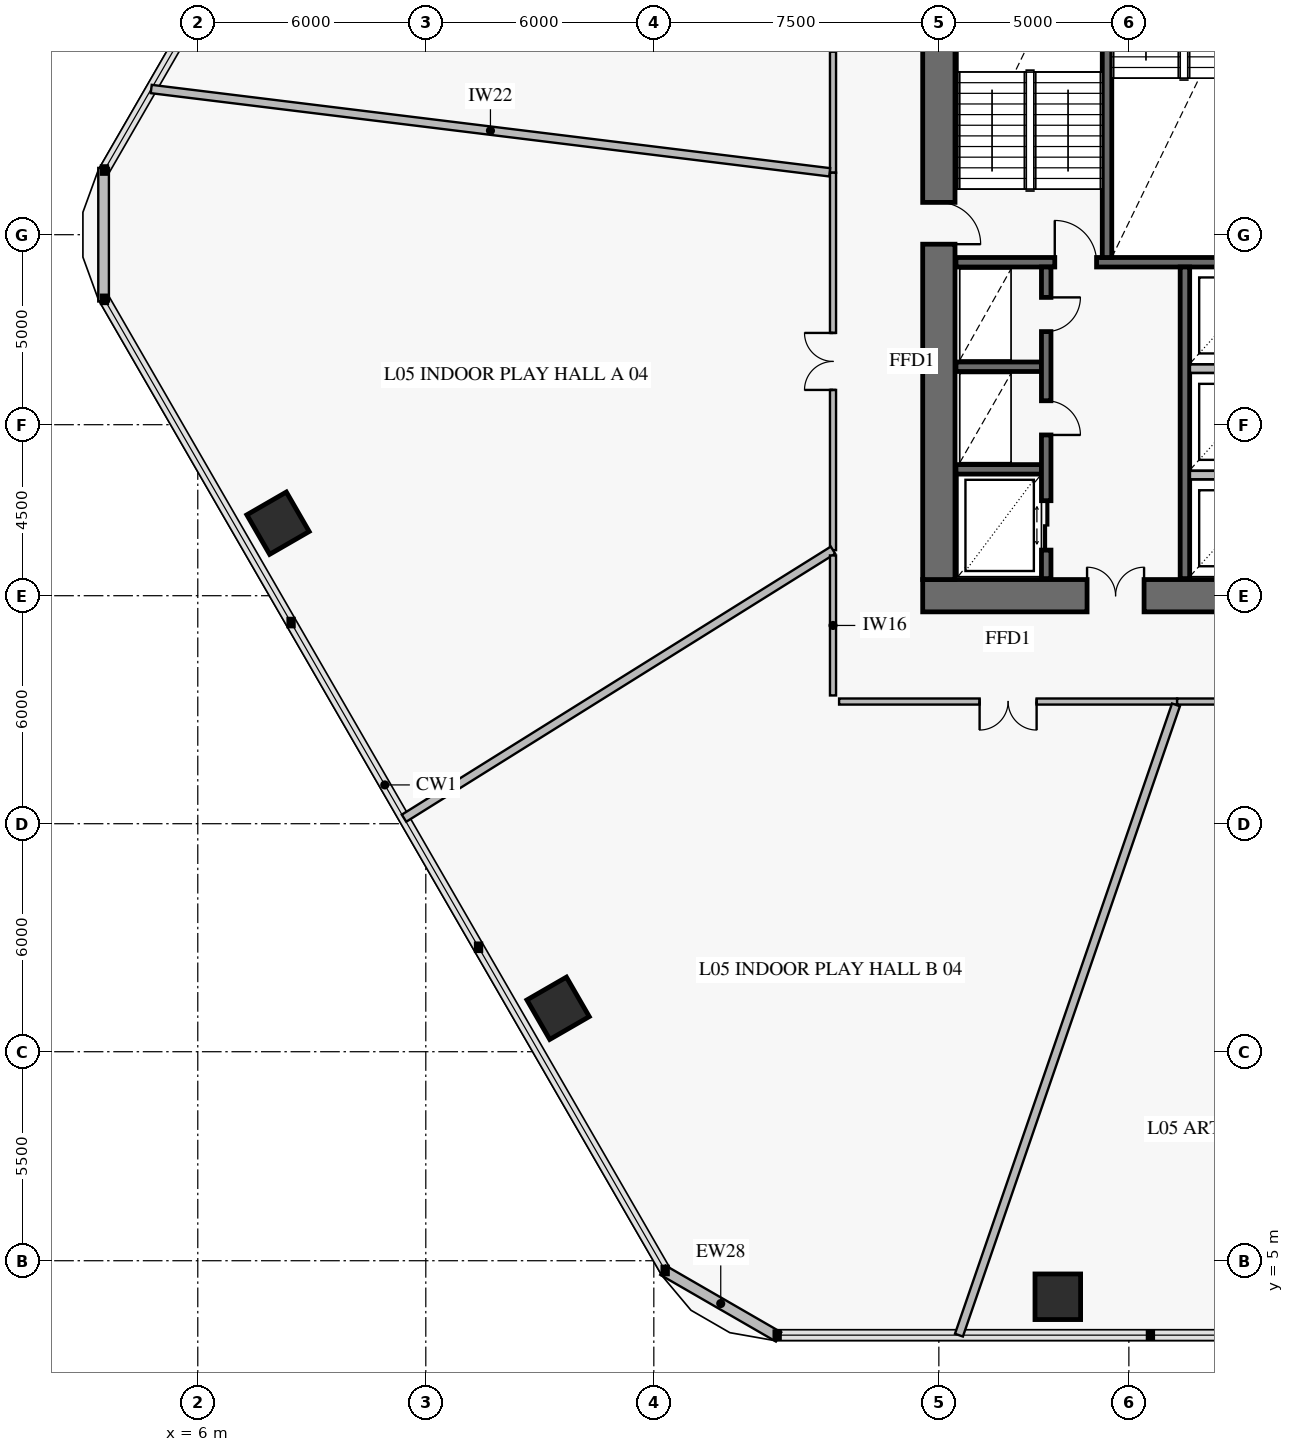
"""IFC4 building model, lengths in metres.
Left out: names, types, materials, properties, quantities, classifications, styles, units other than length and angle.
Written with IfcOpenShell. Run it as: python <this file> out.ifc"""

import sys

from ifc_helpers import new_model, si_unit, direction, frame, frame_2d, origin, origin_2d, place, context, subcontext, project, spatial, rectangle, extrude, element, fill, save


model = new_model("IFC4")
c1 = context("Model", 3, precision=1e-05, world=origin(), true_north=direction((0.0, 1.0)))
c2 = subcontext(c1, "Body", "Model", "MODEL_VIEW")
j1 = project(units=[si_unit("LENGTHUNIT", "METRE"), si_unit("PLANEANGLEUNIT", "RADIAN")], contexts=[c1])
p1 = place(None, origin())
s1 = spatial("IfcSite", under=j1, at=p1, CompositionType="ELEMENT")
p2 = place(p1, origin())
s2 = spatial("IfcBuilding", under=s1, at=p2, CompositionType="ELEMENT")
p3 = place(p2, frame((0.0, 0.0, 20.4)))
s3 = spatial("IfcBuildingStorey", under=s2, at=p3, CompositionType="ELEMENT", Elevation=20.4)
p4 = place(p3, frame((25.075, 22.5, 0.0), z_axis=(0.0, 0.0, 1.0), x_axis=(1.0, 0.0, 0.0)))
e1 = element("IfcWall", 1, at=p4, inside=s3, PredefinedType="SHEAR", context=c2, shape_type="SweptSolid", body=[
    extrude(rectangle(XDim=9.975, YDim=0.85, at=frame_2d((4.988, 0.0))), origin(), (0.0, 0.0, 1.0), 4.2),
])
p5 = place(p4, frame((4.325, 0.0, 0.0)))
e2 = element("IfcOpeningElement", 2, at=p5, cuts=e1, PredefinedType="OPENING", context=c2, shape_type="SweptSolid", body=[
    extrude(rectangle(XDim=1.5, YDim=2.15, at=frame_2d((0.75, 1.075))), frame((0.0, 0.437, 0.0), z_axis=(0.0, -1.0, 0.0), x_axis=(1.0, 0.0, 0.0)), (0.0, 0.0, 1.0), 0.874),
])
p6 = place(p3, frame((25.5, 22.925, 0.0), z_axis=(0.0, 0.0, 1.0), x_axis=(0.0, 1.0, 0.0)))
e3 = element("IfcWall", 3, at=p6, inside=s3, PredefinedType="SHEAR", context=c2, shape_type="SweptSolid", body=[
    extrude(rectangle(XDim=18.15, YDim=0.85, at=frame_2d((9.075, 0.0))), origin(), (0.0, 0.0, 1.0), 4.2),
])
p7 = place(p6, frame((8.825, 0.0, 0.0)))
e4 = element("IfcOpeningElement", 4, at=p7, cuts=e3, PredefinedType="OPENING", context=c2, shape_type="SweptSolid", body=[
    extrude(rectangle(XDim=1.1, YDim=2.15, at=frame_2d((0.55, 1.075))), frame((0.0, 0.437, 0.0), z_axis=(0.0, -1.0, 0.0), x_axis=(1.0, 0.0, 0.0)), (0.0, 0.0, 1.0), 0.874),
])
for number, where, z_axis, x_axis in (
    (5, (8.111, 24.408, 0.0), (0.0, 0.0, 1.0), (0.5, -0.866, 0.0)),
    (6, (15.481, 11.643, 0.0), (0.0, 0.0, 1.0), (0.5, -0.866, 0.0)),
    (7, (28.63, 4.052, 0.0), (0.0, 0.0, 1.0), (1.0, 0.0, 0.0)),
):
    element("IfcColumn", number, at=place(p3, frame(where, z_axis=z_axis, x_axis=x_axis)), inside=s3, PredefinedType="COLUMN", context=c2, shape_type="SweptSolid", body=[
        extrude(rectangle(XDim=1.2, YDim=1.2, at=origin_2d()), origin(), (0.0, 0.0, 1.0), 3.92),
    ])
p8 = place(p3, frame((21.283, 2.994, 0.0), z_axis=(0.0, 0.0, 1.0), x_axis=(-0.866007452331, 0.500031091541, 0.0)))
e8 = element("IfcWall", 8, at=p8, inside=s3, PredefinedType="SOLIDWALL", context=c2, shape_type="SweptSolid", body=[
    extrude(rectangle(XDim=3.515, YDim=0.28, at=frame_2d((1.757, 0.0))), origin(), (0.0, 0.0, 1.0), 3.92),
])
p9 = place(p3, frame((3.521, 30.242, 0.0), z_axis=(0.0, 0.0, 1.0), x_axis=(0.0, 1.0, 0.0)))
e9 = element("IfcWall", 9, at=p9, inside=s3, PredefinedType="SOLIDWALL", context=c2, shape_type="SweptSolid", body=[
    extrude(rectangle(XDim=3.515, YDim=0.28, at=frame_2d((1.758, 0.0))), origin(), (0.0, 0.0, 1.0), 3.92),
])
p10 = place(p3, frame((25.95, 31.275, 0.0), z_axis=(0.0, 0.0, 1.0), x_axis=(1.0, 0.0, 0.0)))
e10 = element("IfcWall", 10, at=p10, inside=s3, PredefinedType="SOLIDWALL", context=c2, shape_type="SweptSolid", body=[
    extrude(rectangle(XDim=20.1, YDim=0.25, at=frame_2d((10.05, 0.0))), origin(), (0.0, 0.0, 1.0), 4.2),
])
p11 = place(p10, frame((2.6, 0.0, 0.0)))
e11 = element("IfcOpeningElement", 11, at=p11, cuts=e10, PredefinedType="OPENING", context=c2, shape_type="SweptSolid", body=[
    extrude(rectangle(XDim=1.1, YDim=2.15, at=frame_2d((0.55, 1.075))), frame((0.0, 0.137, 0.0), z_axis=(0.0, -1.0, 0.0), x_axis=(1.0, 0.0, 0.0)), (0.0, 0.0, 1.0), 0.274),
])
p12 = place(p10, frame((10.6, 0.0, 0.0)))
e12 = element("IfcOpeningElement", 12, at=p12, cuts=e10, PredefinedType="OPENING", context=c2, shape_type="SweptSolid", body=[
    extrude(rectangle(XDim=1.1, YDim=2.15, at=frame_2d((0.55, 1.075))), frame((0.0, 0.137, 0.0), z_axis=(0.0, -1.0, 0.0), x_axis=(1.0, 0.0, 0.0)), (0.0, 0.0, 1.0), 0.274),
])
p13 = place(p10, frame((16.35, 0.0, 0.0)))
e13 = element("IfcOpeningElement", 13, at=p13, cuts=e10, PredefinedType="OPENING", context=c2, shape_type="SweptSolid", body=[
    extrude(rectangle(XDim=1.1, YDim=2.15, at=frame_2d((0.55, 1.075))), frame((0.0, 0.137, 0.0), z_axis=(0.0, -1.0, 0.0), x_axis=(1.0, 0.0, 0.0)), (0.0, 0.0, 1.0), 0.274),
])
p14 = place(p3, frame((29.925, 31.4, 0.0), z_axis=(0.0, 0.0, 1.0), x_axis=(0.0, 1.0, 0.0)))
e14 = element("IfcWall", 14, at=p14, inside=s3, PredefinedType="SOLIDWALL", context=c2, shape_type="SweptSolid", body=[
    extrude(rectangle(XDim=9.7, YDim=0.25, at=frame_2d((4.85, 0.0))), origin(), (0.0, 0.0, 1.0), 4.2),
])
for number, where, z_axis, x_axis in (
    (15, (25.95, 25.825, 0.0), (0.0, 0.0, 1.0), (1.0, 0.0, 0.0)),
    (16, (25.95, 28.525, 0.0), (0.0, 0.0, 1.0), (1.0, 0.0, 0.0)),
):
    element("IfcWall", number, at=place(p3, frame(where, z_axis=z_axis, x_axis=x_axis)), inside=s3, PredefinedType="SOLIDWALL", context=c2, shape_type="SweptSolid", body=[
        extrude(rectangle(XDim=2.25, YDim=0.25, at=frame_2d((1.125, 0.0))), origin(), (0.0, 0.0, 1.0), 4.2),
    ])
p15 = place(p3, frame((28.325, 22.95, 0.0), z_axis=(0.0, 0.0, 1.0), x_axis=(0.0, 1.0, 0.0)))
e17 = element("IfcWall", 17, at=p15, inside=s3, PredefinedType="SOLIDWALL", context=c2, shape_type="SweptSolid", body=[
    extrude(rectangle(XDim=8.2, YDim=0.25, at=frame_2d((4.1, 0.0))), origin(), (0.0, 0.0, 1.0), 4.2),
])
p16 = place(p15, frame((0.75, 0.0, 0.0)))
e18 = element("IfcOpeningElement", 18, at=p16, cuts=e17, PredefinedType="OPENING", context=c2, shape_type="SweptSolid", body=[
    extrude(rectangle(XDim=1.3, YDim=2.3, at=frame_2d((0.65, 1.15))), frame((0.0, 0.137, 0.0), z_axis=(0.0, -1.0, 0.0), x_axis=(1.0, 0.0, 0.0)), (0.0, 0.0, 1.0), 0.274),
])
p17 = place(p15, frame((3.78, 0.0, 0.0)))
e19 = element("IfcOpeningElement", 19, at=p17, cuts=e17, PredefinedType="OPENING", context=c2, shape_type="SweptSolid", body=[
    extrude(rectangle(XDim=0.9, YDim=2.1, at=frame_2d((0.45, 1.05))), frame((0.0, 0.137, 0.0), z_axis=(0.0, -1.0, 0.0), x_axis=(1.0, 0.0, 0.0)), (0.0, 0.0, 1.0), 0.274),
])
p18 = place(p15, frame((6.5, 0.0, 0.0)))
e20 = element("IfcOpeningElement", 20, at=p18, cuts=e17, PredefinedType="OPENING", context=c2, shape_type="SweptSolid", body=[
    extrude(rectangle(XDim=0.9, YDim=2.1, at=frame_2d((0.45, 1.05))), frame((0.0, 0.137, 0.0), z_axis=(0.0, -1.0, 0.0), x_axis=(1.0, 0.0, 0.0)), (0.0, 0.0, 1.0), 0.274),
])
p19 = place(p3, frame((31.975, 22.95, 0.0), z_axis=(0.0, 0.0, 1.0), x_axis=(0.0, 1.0, 0.0)))
e21 = element("IfcWall", 21, at=p19, inside=s3, PredefinedType="SOLIDWALL", context=c2, shape_type="SweptSolid", body=[
    extrude(rectangle(XDim=8.2, YDim=0.25, at=frame_2d((4.1, 0.0))), origin(), (0.0, 0.0, 1.0), 4.2),
])
p20 = place(p3, frame((22.715, 40.961, 0.0), z_axis=(0.0, 0.0, 1.0), x_axis=(0.0, -1.0, 0.0)))
e22 = element("IfcWall", 22, at=p20, inside=s3, PredefinedType="PARTITIONING", context=c2, shape_type="SweptSolid", body=[
    extrude(rectangle(XDim=7.33, YDim=0.16, at=frame_2d((3.665, 0.0))), origin(), (0.0, 0.0, 1.0), 3.22),
])
p21 = place(p20, frame((3.19, 0.0, 0.0)))
e23 = element("IfcOpeningElement", 23, at=p21, cuts=e22, PredefinedType="OPENING", context=c2, shape_type="SweptSolid", body=[
    extrude(rectangle(XDim=0.95, YDim=2.1, at=frame_2d((0.475, 1.05))), frame((0.0, 0.092, 0.0), z_axis=(0.0, -1.0, 0.0), x_axis=(1.0, 0.0, 0.0)), (0.0, 0.0, 1.0), 0.184),
])
p22 = place(p3, frame((22.715, 33.631, 0.0), z_axis=(0.0, 0.0, 1.0), x_axis=(0.0, -1.0, 0.0)))
e24 = element("IfcWall", 24, at=p22, inside=s3, PredefinedType="PARTITIONING", context=c2, shape_type="SweptSolid", body=[
    extrude(rectangle(XDim=9.933, YDim=0.16, at=frame_2d((4.966, 0.0))), origin(), (0.0, 0.0, 1.0), 3.22),
])
p23 = place(p22, frame((4.216, 0.0, 0.0)))
e25 = element("IfcOpeningElement", 25, at=p23, cuts=e24, PredefinedType="OPENING", context=c2, shape_type="SweptSolid", body=[
    extrude(rectangle(XDim=1.5, YDim=2.15, at=frame_2d((0.75, 1.075))), frame((0.0, 0.092, 0.0), z_axis=(0.0, -1.0, 0.0), x_axis=(1.0, 0.0, 0.0)), (0.0, 0.0, 1.0), 0.184),
])
p24 = place(p3, frame((22.875, 19.715, 0.0), z_axis=(0.0, 0.0, 1.0), x_axis=(1.0, 0.0, 0.0)))
e26 = element("IfcWall", 26, at=p24, inside=s3, PredefinedType="PARTITIONING", context=c2, shape_type="SweptSolid", body=[
    extrude(rectangle(XDim=8.895, YDim=0.16, at=frame_2d((4.448, 0.0))), origin(), (0.0, 0.0, 1.0), 3.22),
])
p25 = place(p24, frame((3.698, 0.0, 0.0)))
e27 = element("IfcOpeningElement", 27, at=p25, cuts=e26, PredefinedType="OPENING", context=c2, shape_type="SweptSolid", body=[
    extrude(rectangle(XDim=1.5, YDim=2.15, at=frame_2d((0.75, 1.075))), frame((0.0, 0.092, 0.0), z_axis=(0.0, -1.0, 0.0), x_axis=(1.0, 0.0, 0.0)), (0.0, 0.0, 1.0), 0.184),
])
p26 = place(p3, frame((31.77, 19.715, 0.0), z_axis=(0.0, 0.0, 1.0), x_axis=(1.0, 0.0, 0.0)))
e28 = element("IfcWall", 28, at=p26, inside=s3, PredefinedType="PARTITIONING", context=c2, shape_type="SweptSolid", body=[
    extrude(rectangle(XDim=5.738, YDim=0.16, at=frame_2d((2.869, 0.0))), origin(), (0.0, 0.0, 1.0), 3.22),
])
p27 = place(p26, frame((2.294, 0.0, 0.0)))
e29 = element("IfcOpeningElement", 29, at=p27, cuts=e28, PredefinedType="OPENING", context=c2, shape_type="SweptSolid", body=[
    extrude(rectangle(XDim=1.15, YDim=2.2, at=frame_2d((0.575, 1.1))), frame((0.0, 0.092, 0.0), z_axis=(0.0, -1.0, 0.0), x_axis=(1.0, 0.0, 0.0)), (0.0, 0.0, 1.0), 0.184),
])
for number, where, z_axis, x_axis in (
    (30, (32.108, 25.675, 0.0), (0.0, 0.0, 1.0), (1.0, 0.0, 0.0)),
    (31, (32.108, 28.475, 0.0), (0.0, 0.0, 1.0), (1.0, 0.0, 0.0)),
):
    element("IfcWall", number, at=place(p3, frame(where, z_axis=z_axis, x_axis=x_axis)), inside=s3, PredefinedType="PARTITIONING", context=c2, shape_type="SweptSolid", body=[
        extrude(rectangle(XDim=2.284, YDim=0.22, at=frame_2d((1.142, 0.0))), origin(), (0.0, 0.0, 1.0), 3.92),
    ])
p28 = place(p3, frame((22.627, 33.642, 0.0), z_axis=(0.0, 0.0, 1.0), x_axis=(-0.99254636489, 0.121867606624, 0.0)))
e32 = element("IfcWall", 32, at=p28, inside=s3, PredefinedType="PARTITIONING", context=c2, shape_type="SweptSolid", body=[
    extrude(rectangle(XDim=17.986, YDim=0.22, at=frame_2d((8.993, 0.0))), origin(), (0.0, 0.0, 1.0), 3.17),
])
p29 = place(p3, frame((22.715, 23.698, 0.0), z_axis=(0.0, 0.0, 1.0), x_axis=(-0.848051882484, -0.529913204794, 0.0)))
e33 = element("IfcWall", 33, at=p29, inside=s3, PredefinedType="PARTITIONING", context=c2, shape_type="SweptSolid", body=[
    extrude(rectangle(XDim=13.311, YDim=0.22, at=frame_2d((6.655, 0.0))), origin(), (0.0, 0.0, 1.0), 3.17),
])
p30 = place(p3, frame((22.715, 23.56, 0.0), z_axis=(0.0, 0.0, 1.0), x_axis=(0.0, -1.0, 0.0)))
e34 = element("IfcWall", 34, at=p30, inside=s3, PredefinedType="PARTITIONING", context=c2, shape_type="SweptSolid", body=[
    extrude(rectangle(XDim=3.685, YDim=0.16, at=frame_2d((1.842, 0.0))), origin(), (0.0, 0.0, 1.0), 3.92),
])
p31 = place(p3, frame((31.74, 19.627, 0.0), z_axis=(0.0, 0.0, 1.0), x_axis=(-0.325561284918, -0.945520940943, 0.0)))
e35 = element("IfcWall", 35, at=p31, inside=s3, PredefinedType="PARTITIONING", context=c2, shape_type="SweptSolid", body=[
    extrude(rectangle(XDim=17.541, YDim=0.22, at=frame_2d((8.771, 0.0))), origin(), (0.0, 0.0, 1.0), 3.17),
])
p32 = place(p7, frame((1.1, 0.0, 0.0), z_axis=(0.0, 0.0, 1.0), x_axis=(-1.0, 0.0, 0.0)))
e36 = element("IfcDoor", 36, at=p32, inside=s3, OperationType="SINGLE_SWING_RIGHT", PredefinedType="USERDEFINED", context=c2, shape_type="SweptSolid", body=[
    extrude(rectangle(XDim=1.1, YDim=2.15, at=frame_2d((0.55, 1.075))), frame((0.0, 0.025, 0.0), z_axis=(0.0, -1.0, 0.0), x_axis=(1.0, 0.0, 0.0)), (0.0, 0.0, 1.0), 0.05),
])
fill(e4, e36)
p33 = place(p5, origin())
e37 = element("IfcDoor", 37, at=p33, inside=s3, OperationType="DOUBLE_DOOR_SINGLE_SWING", PredefinedType="DOOR", context=c2, shape_type="SweptSolid", body=[
    extrude(rectangle(XDim=1.5, YDim=2.15, at=frame_2d((0.75, 1.075))), frame((0.0, 0.025, 0.0), z_axis=(0.0, -1.0, 0.0), x_axis=(1.0, 0.0, 0.0)), (0.0, 0.0, 1.0), 0.05),
])
fill(e2, e37)
p34 = place(p11, origin())
e38 = element("IfcDoor", 38, at=p34, inside=s3, OperationType="SINGLE_SWING_LEFT", PredefinedType="USERDEFINED", context=c2, shape_type="SweptSolid", body=[
    extrude(rectangle(XDim=1.1, YDim=2.15, at=frame_2d((0.55, 1.075))), frame((0.0, 0.025, 0.0), z_axis=(0.0, -1.0, 0.0), x_axis=(1.0, 0.0, 0.0)), (0.0, 0.0, 1.0), 0.05),
])
fill(e11, e38)
p35 = place(p16, frame((1.3, 0.0, 0.0), z_axis=(0.0, 0.0, 1.0), x_axis=(-1.0, 0.0, 0.0)))
e39 = element("IfcDoor", 39, at=p35, inside=s3, OperationType="DOUBLE_DOOR_SLIDING", PredefinedType="DOOR", context=c2, shape_type="SweptSolid", body=[
    extrude(rectangle(XDim=1.3, YDim=2.3, at=frame_2d((0.65, 1.15))), frame((0.0, 0.025, 0.0), z_axis=(0.0, -1.0, 0.0), x_axis=(1.0, 0.0, 0.0)), (0.0, 0.0, 1.0), 0.05),
])
fill(e18, e39)
p36 = place(p17, frame((0.9, 0.0, 0.0), z_axis=(0.0, 0.0, 1.0), x_axis=(-1.0, 0.0, 0.0)))
e40 = element("IfcDoor", 40, at=p36, inside=s3, OperationType="SINGLE_SWING_RIGHT", PredefinedType="DOOR", context=c2, shape_type="SweptSolid", body=[
    extrude(rectangle(XDim=0.9, YDim=2.1, at=frame_2d((0.45, 1.05))), frame((0.0, 0.025, 0.0), z_axis=(0.0, -1.0, 0.0), x_axis=(1.0, 0.0, 0.0)), (0.0, 0.0, 1.0), 0.05),
])
fill(e19, e40)
p37 = place(p18, frame((0.9, 0.0, 0.0), z_axis=(0.0, 0.0, 1.0), x_axis=(-1.0, 0.0, 0.0)))
e41 = element("IfcDoor", 41, at=p37, inside=s3, OperationType="SINGLE_SWING_LEFT", PredefinedType="DOOR", context=c2, shape_type="SweptSolid", body=[
    extrude(rectangle(XDim=0.9, YDim=2.1, at=frame_2d((0.45, 1.05))), frame((0.0, 0.025, 0.0), z_axis=(0.0, -1.0, 0.0), x_axis=(1.0, 0.0, 0.0)), (0.0, 0.0, 1.0), 0.05),
])
fill(e20, e41)
p38 = place(p23, frame((1.5, 0.0, 0.0), z_axis=(0.0, 0.0, 1.0), x_axis=(-1.0, 0.0, 0.0)))
e42 = element("IfcDoor", 42, at=p38, inside=s3, OperationType="DOUBLE_DOOR_SINGLE_SWING", PredefinedType="DOOR", context=c2, shape_type="SweptSolid", body=[
    extrude(rectangle(XDim=1.5, YDim=2.15, at=frame_2d((0.75, 1.075))), frame((0.0, 0.025, 0.0), z_axis=(0.0, -1.0, 0.0), x_axis=(1.0, 0.0, 0.0)), (0.0, 0.0, 1.0), 0.05),
])
fill(e25, e42)
p39 = place(p25, frame((1.5, 0.0, 0.0), z_axis=(0.0, 0.0, 1.0), x_axis=(-1.0, 0.0, 0.0)))
e43 = element("IfcDoor", 43, at=p39, inside=s3, OperationType="DOUBLE_DOOR_SINGLE_SWING", PredefinedType="DOOR", context=c2, shape_type="SweptSolid", body=[
    extrude(rectangle(XDim=1.5, YDim=2.15, at=frame_2d((0.75, 1.075))), frame((0.0, 0.025, 0.0), z_axis=(0.0, -1.0, 0.0), x_axis=(1.0, 0.0, 0.0)), (0.0, 0.0, 1.0), 0.05),
])
fill(e27, e43)
save(model, sys.argv[1])
